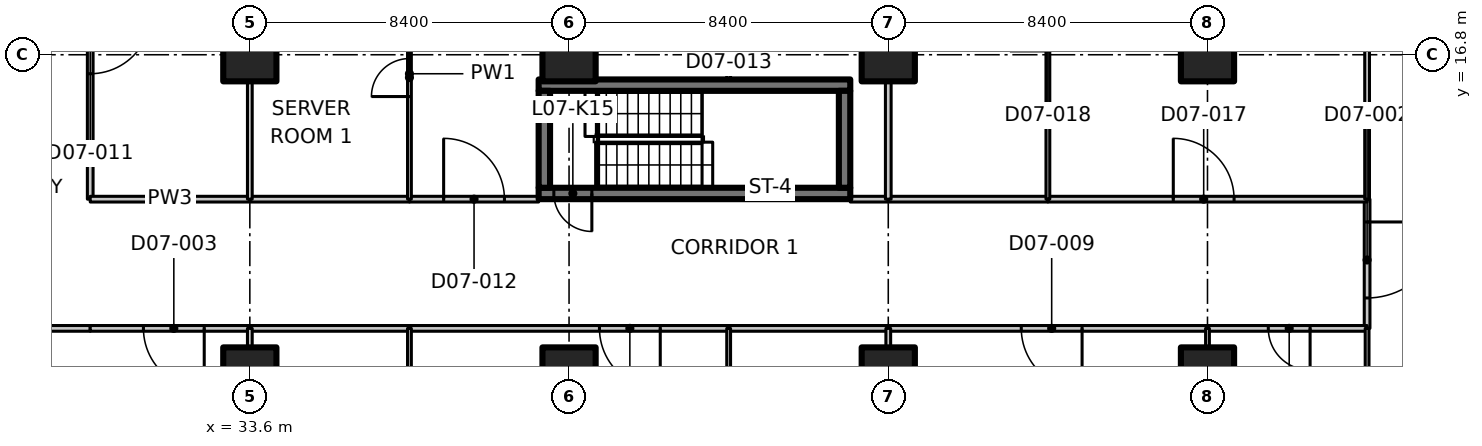
"""IFC4 building model, lengths in metres.
Left out: names, types, materials, properties, quantities, classifications, styles, units other than length and angle.
Written with IfcOpenShell. Run it as: python <this file> out.ifc"""

import sys

from ifc_helpers import new_model, si_unit, direction, frame, frame_2d, origin, origin_2d, place, context, subcontext, project, spatial, polyline, rectangle, outline, extrude, element, fill, save


model = new_model("IFC4")
c1 = context("Model", 3, precision=1e-05, world=origin(), true_north=direction((0.0, 1.0)))
c2 = subcontext(c1, "Body", "Model", "MODEL_VIEW")
j1 = project(units=[si_unit("LENGTHUNIT", "METRE"), si_unit("PLANEANGLEUNIT", "RADIAN")], contexts=[c1])
p1 = place(None, origin())
s1 = spatial("IfcSite", under=j1, at=p1, CompositionType="ELEMENT")
p2 = place(p1, origin())
s2 = spatial("IfcBuilding", under=s1, at=p2, CompositionType="ELEMENT")
p3 = place(p2, frame((0.0, 0.0, 40.1)))
s3 = spatial("IfcBuildingStorey", under=s2, at=p3, CompositionType="ELEMENT", Elevation=40.1)
for number, where, z_axis, x_axis in (
    (1, (33.6, 8.4, 0.0), (0.0, 0.0, 1.0), (1.0, 0.0, 0.0)),
    (2, (33.6, 16.8, 0.0), (0.0, 0.0, 1.0), (1.0, 0.0, 0.0)),
    (3, (42.0, 8.4, 0.0), (0.0, 0.0, 1.0), (1.0, 0.0, 0.0)),
    (4, (42.0, 16.8, 0.0), (0.0, 0.0, 1.0), (1.0, 0.0, 0.0)),
    (5, (50.4, 8.4, 0.0), (0.0, 0.0, 1.0), (1.0, 0.0, 0.0)),
    (6, (50.4, 16.8, 0.0), (0.0, 0.0, 1.0), (1.0, 0.0, 0.0)),
    (7, (58.8, 8.4, 0.0), (0.0, 0.0, 1.0), (1.0, 0.0, 0.0)),
    (8, (58.8, 16.8, 0.0), (0.0, 0.0, 1.0), (1.0, 0.0, 0.0)),
):
    element("IfcColumn", number, at=place(p3, frame(where, z_axis=z_axis, x_axis=x_axis)), inside=s3, PredefinedType="COLUMN", context=c2, shape_type="SweptSolid", body=[
        extrude(rectangle(XDim=1.4, YDim=1.4, at=origin_2d()), origin(), (0.0, 0.0, 1.0), 3.35),
    ])
p4 = place(p3, frame((49.4, 13.15, 0.0), z_axis=(0.0, 0.0, 1.0), x_axis=(-1.0, 0.0, 0.0)))
e9 = element("IfcWall", 9, at=p4, inside=s3, PredefinedType="SHEAR", context=c2, shape_type="SweptSolid", body=[
    extrude(rectangle(XDim=8.2, YDim=0.3, at=frame_2d((4.1, 0.0))), origin(), (0.0, 0.0, 1.0), 3.35),
])
p5 = place(p4, frame((6.8, 0.0, 0.0)))
e10 = element("IfcOpeningElement", 10, at=p5, cuts=e9, PredefinedType="OPENING", context=c2, shape_type="SweptSolid", body=[
    extrude(rectangle(XDim=1.0, YDim=2.1, at=frame_2d((0.5, 1.05))), frame((0.0, 0.16, 0.0), z_axis=(0.0, -1.0, 0.0), x_axis=(1.0, 0.0, 0.0)), (0.0, 0.0, 1.0), 0.32),
])
p6 = place(p3, frame((41.2, 16.0, 0.0), z_axis=(0.0, 0.0, 1.0), x_axis=(1.0, 0.0, 0.0)))
e11 = element("IfcWall", 11, at=p6, inside=s3, PredefinedType="SHEAR", context=c2, shape_type="SweptSolid", body=[
    extrude(rectangle(XDim=8.2, YDim=0.3, at=frame_2d((4.1, 0.0))), origin(), (0.0, 0.0, 1.0), 3.35),
])
for number, where, z_axis, x_axis in (
    (12, (41.35, 13.3, 0.0), (0.0, 0.0, 1.0), (0.0, 1.0, 0.0)),
    (13, (49.25, 13.3, 0.0), (0.0, 0.0, 1.0), (0.0, 1.0, 0.0)),
):
    element("IfcWall", number, at=place(p3, frame(where, z_axis=z_axis, x_axis=x_axis)), inside=s3, PredefinedType="SHEAR", context=c2, shape_type="SweptSolid", body=[
        extrude(rectangle(XDim=2.55, YDim=0.3, at=frame_2d((1.275, 0.0))), origin(), (0.0, 0.0, 1.0), 3.35),
    ])
p7 = place(p3, frame((29.4, 9.6, 0.0), z_axis=(0.0, 0.0, 1.0), x_axis=(-1.0, 0.0, 0.0)))
e14 = element("IfcWall", 14, at=p7, inside=s3, PredefinedType="PARTITIONING", context=c2, shape_type="SweptSolid", body=[
    extrude(rectangle(XDim=4.2, YDim=0.15, at=frame_2d((2.1, 0.0))), origin(), (0.0, 0.0, 1.0), 3.33),
])
p8 = place(p3, frame((29.4, 21.2, 0.0), z_axis=(0.0, 0.0, 1.0), x_axis=(0.0, -1.0, 0.0)))
e15 = element("IfcWall", 15, at=p8, inside=s3, PredefinedType="PARTITIONING", context=c2, shape_type="SweptSolid", body=[
    extrude(rectangle(XDim=8.2, YDim=0.15, at=frame_2d((4.1, 0.0))), origin(), (0.0, 0.0, 1.0), 3.33),
])
p9 = place(p8, frame((3.3, 0.0, 0.0)))
e16 = element("IfcOpeningElement", 16, at=p9, cuts=e15, PredefinedType="OPENING", context=c2, shape_type="SweptSolid", body=[
    extrude(rectangle(XDim=1.6, YDim=2.1, at=frame_2d((0.8, 1.05))), frame((0.0, 0.085, 0.0), z_axis=(0.0, -1.0, 0.0), x_axis=(1.0, 0.0, 0.0)), (0.0, 0.0, 1.0), 0.17),
])
p10 = place(p3, frame((63.0, 13.0, 0.0), z_axis=(0.0, 0.0, 1.0), x_axis=(0.0, -1.0, 0.0)))
e17 = element("IfcWall", 17, at=p10, inside=s3, PredefinedType="PARTITIONING", context=c2, shape_type="SweptSolid", body=[
    extrude(rectangle(XDim=3.4, YDim=0.15, at=frame_2d((1.7, 0.0))), origin(), (0.0, 0.0, 1.0), 3.33),
])
p11 = place(p10, frame((0.6, 0.0, 0.0)))
e18 = element("IfcOpeningElement", 18, at=p11, cuts=e17, PredefinedType="OPENING", context=c2, shape_type="SweptSolid", body=[
    extrude(rectangle(XDim=2.0, YDim=2.4, at=frame_2d((1.0, 1.2))), frame((0.0, 0.085, 0.0), z_axis=(0.0, -1.0, 0.0), x_axis=(1.0, 0.0, 0.0)), (0.0, 0.0, 1.0), 0.17),
])
p12 = place(p3, frame((33.6, 9.6, 0.0), z_axis=(0.0, 0.0, 1.0), x_axis=(-1.0, 0.0, 0.0)))
e19 = element("IfcWall", 19, at=p12, inside=s3, PredefinedType="PARTITIONING", context=c2, shape_type="SweptSolid", body=[
    extrude(rectangle(XDim=4.2, YDim=0.15, at=frame_2d((2.1, 0.0))), origin(), (0.0, 0.0, 1.0), 3.33),
])
p13 = place(p12, frame((1.2, 0.0, 0.0)))
e20 = element("IfcOpeningElement", 20, at=p13, cuts=e19, PredefinedType="OPENING", context=c2, shape_type="SweptSolid", body=[
    extrude(rectangle(XDim=1.6, YDim=2.1, at=frame_2d((0.8, 1.05))), frame((0.0, 0.085, 0.0), z_axis=(0.0, -1.0, 0.0), x_axis=(1.0, 0.0, 0.0)), (0.0, 0.0, 1.0), 0.17),
])
p14 = place(p3, frame((46.2, 9.6, 0.0), z_axis=(0.0, 0.0, 1.0), x_axis=(-1.0, 0.0, 0.0)))
e21 = element("IfcWall", 21, at=p14, inside=s3, PredefinedType="PARTITIONING", context=c2, shape_type="SweptSolid", body=[
    extrude(rectangle(XDim=8.4, YDim=0.15, at=frame_2d((4.2, 0.0))), origin(), (0.0, 0.0, 1.0), 3.33),
])
p15 = place(p14, frame((1.8, 0.0, 0.0)))
e22 = element("IfcOpeningElement", 22, at=p15, cuts=e21, PredefinedType="OPENING", context=c2, shape_type="SweptSolid", body=[
    extrude(rectangle(XDim=1.6, YDim=2.1, at=frame_2d((0.8, 1.05))), frame((0.0, 0.085, 0.0), z_axis=(0.0, -1.0, 0.0), x_axis=(1.0, 0.0, 0.0)), (0.0, 0.0, 1.0), 0.17),
])
for number, where, z_axis, x_axis in (
    (23, (50.4, 9.6, 0.0), (0.0, 0.0, 1.0), (-1.0, 0.0, 0.0)),
    (24, (37.8, 9.6, 0.0), (0.0, 0.0, 1.0), (-1.0, 0.0, 0.0)),
):
    element("IfcWall", number, at=place(p3, frame(where, z_axis=z_axis, x_axis=x_axis)), inside=s3, PredefinedType="PARTITIONING", context=c2, shape_type="SweptSolid", body=[
        extrude(rectangle(XDim=4.2, YDim=0.15, at=frame_2d((2.1, 0.0))), origin(), (0.0, 0.0, 1.0), 3.33),
    ])
p16 = place(p3, frame((58.8, 9.6, 0.0), z_axis=(0.0, 0.0, 1.0), x_axis=(-1.0, 0.0, 0.0)))
e25 = element("IfcWall", 25, at=p16, inside=s3, PredefinedType="PARTITIONING", context=c2, shape_type="SweptSolid", body=[
    extrude(rectangle(XDim=8.4, YDim=0.15, at=frame_2d((4.2, 0.0))), origin(), (0.0, 0.0, 1.0), 3.33),
])
p17 = place(p16, frame((3.3, 0.0, 0.0)))
e26 = element("IfcOpeningElement", 26, at=p17, cuts=e25, PredefinedType="OPENING", context=c2, shape_type="SweptSolid", body=[
    extrude(rectangle(XDim=1.6, YDim=2.1, at=frame_2d((0.8, 1.05))), frame((0.0, 0.085, 0.0), z_axis=(0.0, -1.0, 0.0), x_axis=(1.0, 0.0, 0.0)), (0.0, 0.0, 1.0), 0.17),
])
p18 = place(p3, frame((63.0, 9.6, 0.0), z_axis=(0.0, 0.0, 1.0), x_axis=(-1.0, 0.0, 0.0)))
e27 = element("IfcWall", 27, at=p18, inside=s3, PredefinedType="PARTITIONING", context=c2, shape_type="SweptSolid", body=[
    extrude(rectangle(XDim=4.2, YDim=0.15, at=frame_2d((2.1, 0.0))), origin(), (0.0, 0.0, 1.0), 3.33),
])
p19 = place(p18, frame((1.5, 0.0, 0.0)))
e28 = element("IfcOpeningElement", 28, at=p19, cuts=e27, PredefinedType="OPENING", context=c2, shape_type="SweptSolid", body=[
    extrude(rectangle(XDim=1.1, YDim=2.1, at=frame_2d((0.55, 1.05))), frame((0.0, 0.085, 0.0), z_axis=(0.0, -1.0, 0.0), x_axis=(1.0, 0.0, 0.0)), (0.0, 0.0, 1.0), 0.17),
])
p20 = place(p3, frame((29.4, 13.0, 0.0), z_axis=(0.0, 0.0, 1.0), x_axis=(1.0, 0.0, 0.0)))
e29 = element("IfcWall", 29, at=p20, inside=s3, PredefinedType="PARTITIONING", context=c2, shape_type="SweptSolid", body=[
    extrude(rectangle(XDim=4.2, YDim=0.15, at=frame_2d((2.1, 0.0))), origin(), (0.0, 0.0, 1.0), 3.33),
])
p21 = place(p3, frame((37.8, 13.0, 0.0), z_axis=(0.0, 0.0, 1.0), x_axis=(1.0, 0.0, 0.0)))
e30 = element("IfcWall", 30, at=p21, inside=s3, PredefinedType="PARTITIONING", context=c2, shape_type="SweptSolid", body=[
    extrude(rectangle(XDim=3.4, YDim=0.15, at=frame_2d((1.7, 0.0))), origin(), (0.0, 0.0, 1.0), 3.33),
])
p22 = place(p21, frame((0.9, 0.0, 0.0)))
e31 = element("IfcOpeningElement", 31, at=p22, cuts=e30, PredefinedType="OPENING", context=c2, shape_type="SweptSolid", body=[
    extrude(rectangle(XDim=1.6, YDim=2.1, at=frame_2d((0.8, 1.05))), frame((0.0, 0.085, 0.0), z_axis=(0.0, -1.0, 0.0), x_axis=(1.0, 0.0, 0.0)), (0.0, 0.0, 1.0), 0.17),
])
p23 = place(p3, frame((49.4, 13.0, 0.0), z_axis=(0.0, 0.0, 1.0), x_axis=(1.0, 0.0, 0.0)))
e32 = element("IfcWall", 32, at=p23, inside=s3, PredefinedType="PARTITIONING", context=c2, shape_type="SweptSolid", body=[
    extrude(rectangle(XDim=1.0, YDim=0.15, at=frame_2d((0.5, 0.0))), origin(), (0.0, 0.0, 1.0), 3.33),
])
p24 = place(p3, frame((33.6, 13.0, 0.0), z_axis=(0.0, 0.0, 1.0), x_axis=(1.0, 0.0, 0.0)))
e33 = element("IfcWall", 33, at=p24, inside=s3, PredefinedType="PARTITIONING", context=c2, shape_type="SweptSolid", body=[
    extrude(rectangle(XDim=4.2, YDim=0.15, at=frame_2d((2.1, 0.0))), origin(), (0.0, 0.0, 1.0), 3.33),
])
p25 = place(p3, frame((54.6, 13.0, 0.0), z_axis=(0.0, 0.0, 1.0), x_axis=(1.0, 0.0, 0.0)))
e34 = element("IfcWall", 34, at=p25, inside=s3, PredefinedType="PARTITIONING", context=c2, shape_type="SweptSolid", body=[
    extrude(rectangle(XDim=8.4, YDim=0.15, at=frame_2d((4.2, 0.0))), origin(), (0.0, 0.0, 1.0), 3.33),
])
p26 = place(p25, frame((3.3, 0.0, 0.0)))
e35 = element("IfcOpeningElement", 35, at=p26, cuts=e34, PredefinedType="OPENING", context=c2, shape_type="SweptSolid", body=[
    extrude(rectangle(XDim=1.6, YDim=2.1, at=frame_2d((0.8, 1.05))), frame((0.0, 0.085, 0.0), z_axis=(0.0, -1.0, 0.0), x_axis=(1.0, 0.0, 0.0)), (0.0, 0.0, 1.0), 0.17),
])
p27 = place(p3, frame((50.4, 13.0, 0.0), z_axis=(0.0, 0.0, 1.0), x_axis=(1.0, 0.0, 0.0)))
e36 = element("IfcWall", 36, at=p27, inside=s3, PredefinedType="PARTITIONING", context=c2, shape_type="SweptSolid", body=[
    extrude(rectangle(XDim=4.2, YDim=0.15, at=frame_2d((2.1, 0.0))), origin(), (0.0, 0.0, 1.0), 3.33),
])
p28 = place(p3, frame((63.0, -0.2, 0.0), z_axis=(0.0, 0.0, 1.0), x_axis=(0.0, 1.0, 0.0)))
e37 = element("IfcWall", 37, at=p28, inside=s3, PredefinedType="PARTITIONING", context=c2, shape_type="SweptSolid", body=[
    extrude(outline(polyline([(0.0, 0.0), (9.8, 0.0), (9.8, 3.33), (5.066, 3.33), (5.064, 2.98), (3.736, 2.98), (3.734, 3.33), (0.0, 3.33), (0.0, 0.0)])), frame((0.0, 0.05, 0.0), z_axis=(0.0, -1.0, 0.0), x_axis=(1.0, 0.0, 0.0)), (0.0, 0.0, 1.0), 0.1),
])
p29 = place(p3, frame((63.0, 13.0, 0.0), z_axis=(0.0, 0.0, 1.0), x_axis=(0.0, 1.0, 0.0)))
e38 = element("IfcWall", 38, at=p29, inside=s3, PredefinedType="PARTITIONING", context=c2, shape_type="SweptSolid", body=[
    extrude(outline(polyline([(0.0, 0.0), (12.4, 0.0), (12.4, 3.33), (8.678, 3.33), (8.676, 2.98), (7.324, 2.98), (7.322, 3.33), (0.0, 3.33), (0.0, 0.0)])), frame((0.0, 0.062, 0.0), z_axis=(0.0, -1.0, 0.0), x_axis=(1.0, 0.0, 0.0)), (0.0, 0.0, 1.0), 0.125),
])
p30 = place(p3, frame((33.6, 9.6, 0.0), z_axis=(0.0, 0.0, 1.0), x_axis=(0.0, -1.0, 0.0)))
e39 = element("IfcWall", 39, at=p30, inside=s3, PredefinedType="PARTITIONING", context=c2, shape_type="SweptSolid", body=[
    extrude(rectangle(XDim=0.48, YDim=0.125, at=frame_2d((0.24, 0.0))), origin(), (0.0, 0.0, 1.0), 3.33),
])
p31 = place(p3, frame((46.2, 9.6, 0.0), z_axis=(0.0, 0.0, 1.0), x_axis=(0.0, -1.0, 0.0)))
e40 = element("IfcWall", 40, at=p31, inside=s3, PredefinedType="PARTITIONING", context=c2, shape_type="SweptSolid", body=[
    extrude(rectangle(XDim=7.8, YDim=0.1, at=frame_2d((3.9, 0.0))), origin(), (0.0, 0.0, 1.0), 3.33),
])
p32 = place(p31, frame((3.3, 0.0, 0.0)))
e41 = element("IfcOpeningElement", 41, at=p32, cuts=e40, PredefinedType="OPENING", context=c2, shape_type="SweptSolid", body=[
    extrude(rectangle(XDim=1.0, YDim=2.1, at=frame_2d((0.5, 1.05))), frame((0.0, 0.06, 0.0), z_axis=(0.0, -1.0, 0.0), x_axis=(1.0, 0.0, 0.0)), (0.0, 0.0, 1.0), 0.12),
])
p33 = place(p3, frame((37.8, 1.8, 0.0), z_axis=(0.0, 0.0, 1.0), x_axis=(0.0, 1.0, 0.0)))
e42 = element("IfcWall", 42, at=p33, inside=s3, PredefinedType="PARTITIONING", context=c2, shape_type="SweptSolid", body=[
    extrude(rectangle(XDim=7.8, YDim=0.1, at=frame_2d((3.9, 0.0))), origin(), (0.0, 0.0, 1.0), 3.33),
])
p34 = place(p33, frame((3.3, 0.0, 0.0)))
e43 = element("IfcOpeningElement", 43, at=p34, cuts=e42, PredefinedType="OPENING", context=c2, shape_type="SweptSolid", body=[
    extrude(rectangle(XDim=1.0, YDim=2.1, at=frame_2d((0.5, 1.05))), frame((0.0, 0.06, 0.0), z_axis=(0.0, -1.0, 0.0), x_axis=(1.0, 0.0, 0.0)), (0.0, 0.0, 1.0), 0.12),
])
p35 = place(p3, frame((50.4, 9.6, 0.0), z_axis=(0.0, 0.0, 1.0), x_axis=(0.0, -1.0, 0.0)))
e44 = element("IfcWall", 44, at=p35, inside=s3, PredefinedType="PARTITIONING", context=c2, shape_type="SweptSolid", body=[
    extrude(rectangle(XDim=0.48, YDim=0.125, at=frame_2d((0.24, 0.0))), origin(), (0.0, 0.0, 1.0), 3.33),
])
p36 = place(p3, frame((58.8, 9.6, 0.0), z_axis=(0.0, 0.0, 1.0), x_axis=(0.0, -1.0, 0.0)))
e45 = element("IfcWall", 45, at=p36, inside=s3, PredefinedType="PARTITIONING", context=c2, shape_type="SweptSolid", body=[
    extrude(rectangle(XDim=0.48, YDim=0.1, at=frame_2d((0.24, 0.0))), origin(), (0.0, 0.0, 1.0), 3.33),
])
p37 = place(p3, frame((33.6, 16.08, 0.0), z_axis=(0.0, 0.0, 1.0), x_axis=(0.0, -1.0, 0.0)))
e46 = element("IfcWall", 46, at=p37, inside=s3, PredefinedType="PARTITIONING", context=c2, shape_type="SweptSolid", body=[
    extrude(rectangle(XDim=3.08, YDim=0.125, at=frame_2d((1.54, 0.0))), origin(), (0.0, 0.0, 1.0), 3.33),
])
p38 = place(p3, frame((46.2, 21.4, 0.0), z_axis=(0.0, 0.0, 1.0), x_axis=(0.0, -1.0, 0.0)))
e47 = element("IfcWall", 47, at=p38, inside=s3, PredefinedType="PARTITIONING", context=c2, shape_type="SweptSolid", body=[
    extrude(rectangle(XDim=5.25, YDim=0.1, at=frame_2d((2.625, 0.0))), origin(), (0.0, 0.0, 1.0), 3.33),
])
p39 = place(p38, frame((2.1, 0.0, 0.0)))
e48 = element("IfcOpeningElement", 48, at=p39, cuts=e47, PredefinedType="OPENING", context=c2, shape_type="SweptSolid", body=[
    extrude(rectangle(XDim=1.0, YDim=2.1, at=frame_2d((0.5, 1.05))), frame((0.0, 0.06, 0.0), z_axis=(0.0, -1.0, 0.0), x_axis=(1.0, 0.0, 0.0)), (0.0, 0.0, 1.0), 0.12),
])
p40 = place(p3, frame((37.8, 13.0, 0.0), z_axis=(0.0, 0.0, 1.0), x_axis=(0.0, 1.0, 0.0)))
e49 = element("IfcWall", 49, at=p40, inside=s3, PredefinedType="PARTITIONING", context=c2, shape_type="SweptSolid", body=[
    extrude(rectangle(XDim=6.6, YDim=0.1, at=frame_2d((3.3, 0.0))), origin(), (0.0, 0.0, 1.0), 3.33),
])
p41 = place(p40, frame((2.7, 0.0, 0.0)))
e50 = element("IfcOpeningElement", 50, at=p41, cuts=e49, PredefinedType="OPENING", context=c2, shape_type="SweptSolid", body=[
    extrude(rectangle(XDim=1.0, YDim=2.1, at=frame_2d((0.5, 1.05))), frame((0.0, 0.06, 0.0), z_axis=(0.0, -1.0, 0.0), x_axis=(1.0, 0.0, 0.0)), (0.0, 0.0, 1.0), 0.12),
])
p42 = place(p3, frame((50.4, 16.08, 0.0), z_axis=(0.0, 0.0, 1.0), x_axis=(0.0, -1.0, 0.0)))
e51 = element("IfcWall", 51, at=p42, inside=s3, PredefinedType="PARTITIONING", context=c2, shape_type="SweptSolid", body=[
    extrude(rectangle(XDim=3.08, YDim=0.15, at=frame_2d((1.54, 0.0))), origin(), (0.0, 0.0, 1.0), 3.33),
])
p43 = place(p3, frame((54.6, 13.0, 0.0), z_axis=(0.0, 0.0, 1.0), x_axis=(0.0, 1.0, 0.0)))
e52 = element("IfcWall", 52, at=p43, inside=s3, PredefinedType="PARTITIONING", context=c2, shape_type="SweptSolid", body=[
    extrude(rectangle(XDim=9.0, YDim=0.1, at=frame_2d((4.5, 0.0))), origin(), (0.0, 0.0, 1.0), 3.33),
])
p44 = place(p43, frame((3.9, 0.0, 0.0)))
e53 = element("IfcOpeningElement", 53, at=p44, cuts=e52, PredefinedType="OPENING", context=c2, shape_type="SweptSolid", body=[
    extrude(rectangle(XDim=1.0, YDim=2.1, at=frame_2d((0.5, 1.05))), frame((0.0, 0.06, 0.0), z_axis=(0.0, -1.0, 0.0), x_axis=(1.0, 0.0, 0.0)), (0.0, 0.0, 1.0), 0.12),
])
p45 = place(p5, origin())
e54 = element("IfcDoor", 54, at=p45, inside=s3, OperationType="SINGLE_SWING_LEFT", PredefinedType="DOOR", context=c2, shape_type="SweptSolid", body=[
    extrude(rectangle(XDim=1.0, YDim=2.1, at=frame_2d((0.5, 1.05))), frame((0.0, 0.025, 0.0), z_axis=(0.0, -1.0, 0.0), x_axis=(1.0, 0.0, 0.0)), (0.0, 0.0, 1.0), 0.05),
])
fill(e10, e54)
p46 = place(p11, origin())
e55 = element("IfcDoor", 55, at=p46, inside=s3, OperationType="DOUBLE_DOOR_SINGLE_SWING", PredefinedType="DOOR", context=c2, shape_type="SweptSolid", body=[
    extrude(rectangle(XDim=2.0, YDim=2.4, at=frame_2d((1.0, 1.2))), frame((0.0, 0.025, 0.0), z_axis=(0.0, -1.0, 0.0), x_axis=(1.0, 0.0, 0.0)), (0.0, 0.0, 1.0), 0.05),
])
fill(e18, e55)
p47 = place(p13, origin())
e56 = element("IfcDoor", 56, at=p47, inside=s3, OperationType="DOUBLE_DOOR_SINGLE_SWING", PredefinedType="DOOR", context=c2, shape_type="SweptSolid", body=[
    extrude(rectangle(XDim=1.6, YDim=2.1, at=frame_2d((0.8, 1.05))), frame((0.0, 0.025, 0.0), z_axis=(0.0, -1.0, 0.0), x_axis=(1.0, 0.0, 0.0)), (0.0, 0.0, 1.0), 0.05),
])
fill(e20, e56)
p48 = place(p15, origin())
e57 = element("IfcDoor", 57, at=p48, inside=s3, OperationType="DOUBLE_DOOR_SINGLE_SWING", PredefinedType="DOOR", context=c2, shape_type="SweptSolid", body=[
    extrude(rectangle(XDim=1.6, YDim=2.1, at=frame_2d((0.8, 1.05))), frame((0.0, 0.025, 0.0), z_axis=(0.0, -1.0, 0.0), x_axis=(1.0, 0.0, 0.0)), (0.0, 0.0, 1.0), 0.05),
])
fill(e22, e57)
p49 = place(p17, origin())
e58 = element("IfcDoor", 58, at=p49, inside=s3, OperationType="DOUBLE_DOOR_SINGLE_SWING", PredefinedType="DOOR", context=c2, shape_type="SweptSolid", body=[
    extrude(rectangle(XDim=1.6, YDim=2.1, at=frame_2d((0.8, 1.05))), frame((0.0, 0.025, 0.0), z_axis=(0.0, -1.0, 0.0), x_axis=(1.0, 0.0, 0.0)), (0.0, 0.0, 1.0), 0.05),
])
fill(e26, e58)
p50 = place(p19, origin())
e59 = element("IfcDoor", 59, at=p50, inside=s3, OperationType="SINGLE_SWING_LEFT", PredefinedType="DOOR", context=c2, shape_type="SweptSolid", body=[
    extrude(rectangle(XDim=1.1, YDim=2.1, at=frame_2d((0.55, 1.05))), frame((0.0, 0.025, 0.0), z_axis=(0.0, -1.0, 0.0), x_axis=(1.0, 0.0, 0.0)), (0.0, 0.0, 1.0), 0.05),
])
fill(e28, e59)
p51 = place(p9, origin())
e60 = element("IfcDoor", 60, at=p51, inside=s3, OperationType="DOUBLE_DOOR_SINGLE_SWING", PredefinedType="DOOR", context=c2, shape_type="SweptSolid", body=[
    extrude(rectangle(XDim=1.6, YDim=2.1, at=frame_2d((0.8, 1.05))), frame((0.0, 0.025, 0.0), z_axis=(0.0, -1.0, 0.0), x_axis=(1.0, 0.0, 0.0)), (0.0, 0.0, 1.0), 0.05),
])
fill(e16, e60)
p52 = place(p22, origin())
e61 = element("IfcDoor", 61, at=p52, inside=s3, OperationType="DOUBLE_DOOR_SINGLE_SWING", PredefinedType="DOOR", context=c2, shape_type="SweptSolid", body=[
    extrude(rectangle(XDim=1.6, YDim=2.1, at=frame_2d((0.8, 1.05))), frame((0.0, 0.025, 0.0), z_axis=(0.0, -1.0, 0.0), x_axis=(1.0, 0.0, 0.0)), (0.0, 0.0, 1.0), 0.05),
])
fill(e31, e61)
p53 = place(p41, origin())
e62 = element("IfcDoor", 62, at=p53, inside=s3, OperationType="SINGLE_SWING_LEFT", PredefinedType="DOOR", context=c2, shape_type="SweptSolid", body=[
    extrude(rectangle(XDim=1.0, YDim=2.1, at=frame_2d((0.5, 1.05))), frame((0.0, 0.025, 0.0), z_axis=(0.0, -1.0, 0.0), x_axis=(1.0, 0.0, 0.0)), (0.0, 0.0, 1.0), 0.05),
])
fill(e50, e62)
p54 = place(p26, origin())
e63 = element("IfcDoor", 63, at=p54, inside=s3, OperationType="DOUBLE_DOOR_SINGLE_SWING", PredefinedType="DOOR", context=c2, shape_type="SweptSolid", body=[
    extrude(rectangle(XDim=1.6, YDim=2.1, at=frame_2d((0.8, 1.05))), frame((0.0, 0.025, 0.0), z_axis=(0.0, -1.0, 0.0), x_axis=(1.0, 0.0, 0.0)), (0.0, 0.0, 1.0), 0.05),
])
fill(e35, e63)
save(model, sys.argv[1])
